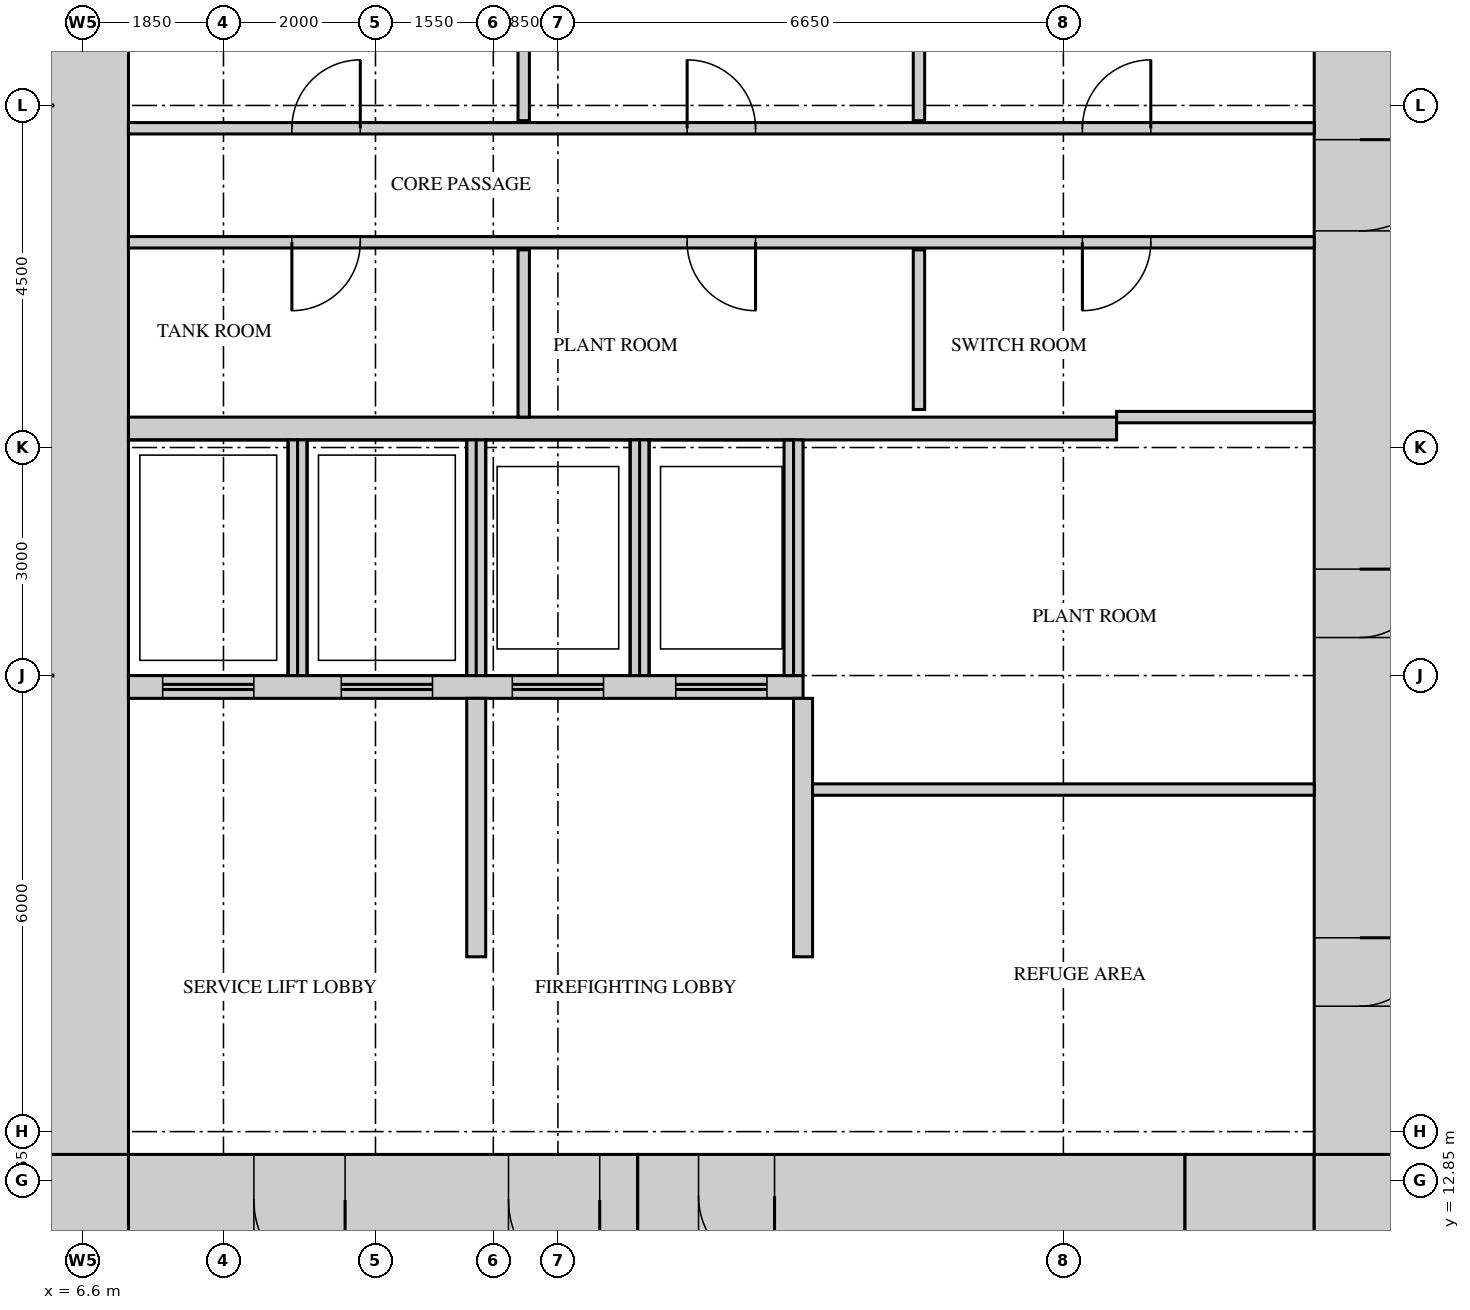
"""IFC4 building model, lengths in metres.
Left out: names, types, materials, properties, quantities, classifications, styles, units other than length and angle.
Written with IfcOpenShell. Run it as: python <this file> out.ifc"""

import sys

from ifc_helpers import new_model, si_unit, direction, frame, frame_2d, origin, place, context, subcontext, project, spatial, rectangle, extrude, source, transform, mapped, element, fill, save


model = new_model("IFC4")
c1 = context("Model", 3, precision=1e-05, world=origin(), true_north=direction((0.0, 1.0)))
c2 = subcontext(c1, "Body", "Model", "MODEL_VIEW")
j1 = project(units=[si_unit("LENGTHUNIT", "METRE"), si_unit("PLANEANGLEUNIT", "RADIAN")], contexts=[c1])
p1 = place(None, origin())
s1 = spatial("IfcSite", under=j1, at=p1, CompositionType="ELEMENT")
p2 = place(p1, origin())
s2 = spatial("IfcBuilding", under=s1, at=p2, CompositionType="ELEMENT")
p3 = place(p2, frame((0.0, 0.0, 96.0)))
s3 = spatial("IfcBuildingStorey", under=s2, at=p3, CompositionType="ELEMENT", Elevation=96.0)
m1 = source(origin(), c2, "Body", "SweptSolid", [
    extrude(rectangle(XDim=6.7, YDim=1.2, at=frame_2d((3.35, 0.0))), origin(), (0.0, 0.0, 1.0), 5.2),
])
p4 = place(p3, frame((7.2, 12.6, 0.0), z_axis=(0.0, 0.0, 1.0), x_axis=(1.0, 0.0, 0.0)))
e1 = element("IfcWall", 1, at=p4, inside=s3, PredefinedType="SHEAR", context=c2, shape_type="MappedRepresentation", body=[
    mapped(m1, transform((0.0, 0.0, 0.0))),
])
m2 = source(origin(), c2, "Body", "SweptSolid", [
    extrude(rectangle(XDim=1.2, YDim=2.1, at=frame_2d((0.6, 1.05))), frame((0.0, 0.61, 0.0), z_axis=(0.0, -1.0, 0.0), x_axis=(1.0, 0.0, 0.0)), (0.0, 0.0, 1.0), 1.22),
])
p5 = place(p4, frame((5.0, 0.0, 0.0)))
e2 = element("IfcOpeningElement", 2, at=p5, cuts=e1, PredefinedType="OPENING", context=c2, shape_type="MappedRepresentation", body=[
    mapped(m2, transform((0.0, 0.0, 0.0))),
])
p6 = place(p4, frame((1.65, 0.0, 0.0)))
e3 = element("IfcOpeningElement", 3, at=p6, cuts=e1, PredefinedType="OPENING", context=c2, shape_type="MappedRepresentation", body=[
    mapped(m2, transform((0.0, 0.0, 0.0))),
])
m3 = source(origin(), c2, "Body", "SweptSolid", [
    extrude(rectangle(XDim=7.2, YDim=1.1, at=frame_2d((3.6, 0.0))), origin(), (0.0, 0.0, 1.0), 5.2),
])
p7 = place(p3, frame((13.9, 12.65, 0.0), z_axis=(0.0, 0.0, 1.0), x_axis=(1.0, 0.0, 0.0)))
e4 = element("IfcWall", 4, at=p7, inside=s3, PredefinedType="SHEAR", context=c2, shape_type="MappedRepresentation", body=[
    mapped(m3, transform((0.0, 0.0, 0.0))),
])
m4 = source(origin(), c2, "Body", "SweptSolid", [
    extrude(rectangle(XDim=1.0, YDim=2.1, at=frame_2d((0.5, 1.05))), frame((0.0, 0.56, 0.0), z_axis=(0.0, -1.0, 0.0), x_axis=(1.0, 0.0, 0.0)), (0.0, 0.0, 1.0), 1.12),
])
p8 = place(p7, frame((0.8, 0.0, 0.0)))
e5 = element("IfcOpeningElement", 5, at=p8, cuts=e4, PredefinedType="OPENING", context=c2, shape_type="MappedRepresentation", body=[
    mapped(m4, transform((0.0, 0.0, 0.0))),
])
m5 = source(origin(), c2, "Body", "SweptSolid", [
    extrude(rectangle(XDim=1.7, YDim=1.2, at=frame_2d((0.85, 0.0))), origin(), (0.0, 0.0, 1.0), 5.2),
])
p9 = place(p3, frame((21.1, 12.6, 0.0), z_axis=(0.0, 0.0, 1.0), x_axis=(1.0, 0.0, 0.0)))
e6 = element("IfcWall", 6, at=p9, inside=s3, PredefinedType="SHEAR", context=c2, shape_type="MappedRepresentation", body=[
    mapped(m5, transform((0.0, 0.0, 0.0))),
])
m6 = source(origin(), c2, "Body", "SweptSolid", [
    extrude(rectangle(XDim=1.2, YDim=1.2, at=frame_2d((0.6, 0.0))), origin(), (0.0, 0.0, 1.0), 5.2),
])
for number, where, z_axis, x_axis in (
    (7, (22.8, 12.6, 0.0), (0.0, 0.0, 1.0), (1.0, 0.0, 0.0)),
    (8, (6.0, 12.6, 0.0), (0.0, 0.0, 1.0), (1.0, 0.0, 0.0)),
):
    element("IfcWall", number, at=place(p3, frame(where, z_axis=z_axis, x_axis=x_axis)), inside=s3, PredefinedType="SHEAR", context=c2, shape_type="MappedRepresentation", body=[
        mapped(m6, transform((0.0, 0.0, 0.0))),
    ])
m7 = source(origin(), c2, "Body", "SweptSolid", [
    extrude(rectangle(XDim=27.6, YDim=1.2, at=frame_2d((13.8, 0.0))), origin(), (0.0, 0.0, 1.0), 5.2),
])
p10 = place(p3, frame((23.4, 13.2, 0.0), z_axis=(0.0, 0.0, 1.0), x_axis=(0.0, 1.0, 0.0)))
e9 = element("IfcWall", 9, at=p10, inside=s3, PredefinedType="SHEAR", context=c2, shape_type="MappedRepresentation", body=[
    mapped(m7, transform((0.0, 0.0, 0.0))),
])
m8 = source(origin(), c2, "Body", "SweptSolid", [
    extrude(rectangle(XDim=1.8, YDim=2.1, at=frame_2d((0.9, 1.05))), frame((0.0, 0.61, 0.0), z_axis=(0.0, -1.0, 0.0), x_axis=(1.0, 0.0, 0.0)), (0.0, 0.0, 1.0), 1.22),
])
p11 = place(p10, frame((22.4, 0.0, 0.0)))
e10 = element("IfcOpeningElement", 10, at=p11, cuts=e9, PredefinedType="OPENING", context=c2, shape_type="MappedRepresentation", body=[
    mapped(m8, transform((0.0, 0.0, 0.0))),
])
p12 = place(p10, frame((12.15, 0.0, 0.0)))
e11 = element("IfcOpeningElement", 11, at=p12, cuts=e9, PredefinedType="OPENING", context=c2, shape_type="MappedRepresentation", body=[
    mapped(m2, transform((0.0, 0.0, 0.0))),
])
m9 = source(origin(), c2, "Body", "SweptSolid", [
    extrude(rectangle(XDim=0.9, YDim=2.1, at=frame_2d((0.45, 1.05))), frame((0.0, 0.61, 0.0), z_axis=(0.0, -1.0, 0.0), x_axis=(1.0, 0.0, 0.0)), (0.0, 0.0, 1.0), 1.22),
])
p13 = place(p10, frame((1.95, 0.0, 0.0)))
e12 = element("IfcOpeningElement", 12, at=p13, cuts=e9, PredefinedType="OPENING", context=c2, shape_type="MappedRepresentation", body=[
    mapped(m9, transform((0.0, 0.0, 0.0))),
])
p14 = place(p10, frame((6.8, 0.0, 0.0)))
e13 = element("IfcOpeningElement", 13, at=p14, cuts=e9, PredefinedType="OPENING", context=c2, shape_type="MappedRepresentation", body=[
    mapped(m9, transform((0.0, 0.0, 0.0))),
])
p15 = place(p3, frame((6.6, 13.2, 0.0), z_axis=(0.0, 0.0, 1.0), x_axis=(0.0, 1.0, 0.0)))
e14 = element("IfcWall", 14, at=p15, inside=s3, PredefinedType="SHEAR", context=c2, shape_type="MappedRepresentation", body=[
    mapped(m7, transform((0.0, 0.0, 0.0))),
])
m10 = source(origin(), c2, "Body", "SweptSolid", [
    extrude(rectangle(XDim=13.0, YDim=0.3, at=frame_2d((6.5, 0.0))), origin(), (0.0, 0.0, 1.0), 5.2),
])
p16 = place(p3, frame((7.2, 22.75, 0.0), z_axis=(0.0, 0.0, 1.0), x_axis=(1.0, 0.0, 0.0)))
e15 = element("IfcWall", 15, at=p16, inside=s3, PredefinedType="STANDARD", context=c2, shape_type="MappedRepresentation", body=[
    mapped(m10, transform((0.0, 0.0, 0.0))),
])
m11 = source(origin(), c2, "Body", "SweptSolid", [
    extrude(rectangle(XDim=8.875, YDim=0.3, at=frame_2d((4.438, 0.0))), origin(), (0.0, 0.0, 1.0), 5.2),
])
p17 = place(p3, frame((7.2, 19.35, 0.0), z_axis=(0.0, 0.0, 1.0), x_axis=(1.0, 0.0, 0.0)))
e16 = element("IfcWall", 16, at=p17, inside=s3, PredefinedType="STANDARD", context=c2, shape_type="MappedRepresentation", body=[
    mapped(m11, transform((0.0, 0.0, 0.0))),
])
m12 = source(origin(), c2, "Body", "SweptSolid", [
    extrude(rectangle(XDim=1.2, YDim=2.1, at=frame_2d((0.6, 1.05))), frame((0.0, 0.16, 0.0), z_axis=(0.0, -1.0, 0.0), x_axis=(1.0, 0.0, 0.0)), (0.0, 0.0, 1.0), 0.32),
])
p18 = place(p17, frame((0.45, 0.0, 0.0)))
e17 = element("IfcOpeningElement", 17, at=p18, cuts=e16, PredefinedType="OPENING", context=c2, shape_type="MappedRepresentation", body=[
    mapped(m12, transform((0.0, 0.0, 0.0))),
])
p19 = place(p17, frame((2.8, 0.0, 0.0)))
e18 = element("IfcOpeningElement", 18, at=p19, cuts=e16, PredefinedType="OPENING", context=c2, shape_type="MappedRepresentation", body=[
    mapped(m12, transform((0.0, 0.0, 0.0))),
])
p20 = place(p17, frame((5.05, 0.0, 0.0)))
e19 = element("IfcOpeningElement", 19, at=p20, cuts=e16, PredefinedType="OPENING", context=c2, shape_type="MappedRepresentation", body=[
    mapped(m12, transform((0.0, 0.0, 0.0))),
])
p21 = place(p17, frame((7.2, 0.0, 0.0)))
e20 = element("IfcOpeningElement", 20, at=p21, cuts=e16, PredefinedType="OPENING", context=c2, shape_type="MappedRepresentation", body=[
    mapped(m12, transform((0.0, 0.0, 0.0))),
])
m13 = source(origin(), c2, "Body", "SweptSolid", [
    extrude(rectangle(XDim=3.1, YDim=0.25, at=frame_2d((1.55, 0.0))), origin(), (0.0, 0.0, 1.0), 5.2),
])
for number, where, z_axis, x_axis in (
    (21, (9.425, 19.5, 0.0), (0.0, 0.0, 1.0), (0.0, 1.0, 0.0)),
    (22, (11.775, 19.5, 0.0), (0.0, 0.0, 1.0), (0.0, 1.0, 0.0)),
    (23, (13.925, 19.5, 0.0), (0.0, 0.0, 1.0), (0.0, 1.0, 0.0)),
    (24, (15.95, 19.5, 0.0), (0.0, 0.0, 1.0), (0.0, 1.0, 0.0)),
):
    element("IfcWall", number, at=place(p3, frame(where, z_axis=z_axis, x_axis=x_axis)), inside=s3, PredefinedType="STANDARD", context=c2, shape_type="MappedRepresentation", body=[
        mapped(m13, transform((0.0, 0.0, 0.0))),
    ])
m14 = source(origin(), c2, "Body", "SweptSolid", [
    extrude(rectangle(XDim=3.4, YDim=0.25, at=frame_2d((1.7, 0.0))), origin(), (0.0, 0.0, 1.0), 5.2),
])
for number, where, z_axis, x_axis in (
    (25, (16.075, 15.8, 0.0), (0.0, 0.0, 1.0), (0.0, 1.0, 0.0)),
    (26, (11.775, 15.8, 0.0), (0.0, 0.0, 1.0), (0.0, 1.0, 0.0)),
):
    element("IfcWall", number, at=place(p3, frame(where, z_axis=z_axis, x_axis=x_axis)), inside=s3, PredefinedType="STANDARD", context=c2, shape_type="MappedRepresentation", body=[
        mapped(m14, transform((0.0, 0.0, 0.0))),
    ])
m15 = source(origin(), c2, "Body", "SweptSolid", [
    extrude(rectangle(XDim=6.6, YDim=0.15, at=frame_2d((3.3, 0.0))), origin(), (0.0, 0.0, 1.0), 5.2),
])
p22 = place(p3, frame((16.2, 18.0, 0.0), z_axis=(0.0, 0.0, 1.0), x_axis=(1.0, 0.0, 0.0)))
e27 = element("IfcWall", 27, at=p22, inside=s3, PredefinedType="PARTITIONING", context=c2, shape_type="MappedRepresentation", body=[
    mapped(m15, transform((0.0, 0.0, 0.0))),
])
m16 = source(origin(), c2, "Body", "SweptSolid", [
    extrude(rectangle(XDim=2.2, YDim=0.15, at=frame_2d((1.1, 0.0))), origin(), (0.0, 0.0, 1.0), 5.2),
])
p23 = place(p3, frame((12.4, 22.9, 0.0), z_axis=(0.0, 0.0, 1.0), x_axis=(0.0, 1.0, 0.0)))
e28 = element("IfcWall", 28, at=p23, inside=s3, PredefinedType="PARTITIONING", context=c2, shape_type="MappedRepresentation", body=[
    mapped(m16, transform((0.0, 0.0, 0.0))),
])
m17 = source(origin(), c2, "Body", "SweptSolid", [
    extrude(rectangle(XDim=2.6, YDim=0.15, at=frame_2d((1.3, 0.0))), origin(), (0.0, 0.0, 1.0), 5.2),
])
p24 = place(p3, frame((20.2, 22.9, 0.0), z_axis=(0.0, 0.0, 1.0), x_axis=(1.0, 0.0, 0.0)))
e29 = element("IfcWall", 29, at=p24, inside=s3, PredefinedType="PARTITIONING", context=c2, shape_type="MappedRepresentation", body=[
    mapped(m17, transform((0.0, 0.0, 0.0))),
])
m18 = source(origin(), c2, "Body", "SweptSolid", [
    extrude(rectangle(XDim=2.1, YDim=0.15, at=frame_2d((1.05, 0.0))), origin(), (0.0, 0.0, 1.0), 5.2),
])
p25 = place(p3, frame((17.6, 23.0, 0.0), z_axis=(0.0, 0.0, 1.0), x_axis=(0.0, 1.0, 0.0)))
e30 = element("IfcWall", 30, at=p25, inside=s3, PredefinedType="PARTITIONING", context=c2, shape_type="MappedRepresentation", body=[
    mapped(m18, transform((0.0, 0.0, 0.0))),
])
m19 = source(origin(), c2, "Body", "SweptSolid", [
    extrude(rectangle(XDim=15.6, YDim=0.15, at=frame_2d((7.8, 0.0))), origin(), (0.0, 0.0, 1.0), 5.2),
])
p26 = place(p3, frame((7.2, 25.2, 0.0), z_axis=(0.0, 0.0, 1.0), x_axis=(1.0, 0.0, 0.0)))
e31 = element("IfcWall", 31, at=p26, inside=s3, PredefinedType="PARTITIONING", context=c2, shape_type="MappedRepresentation", body=[
    mapped(m19, transform((0.0, 0.0, 0.0))),
])
m20 = source(origin(), c2, "Body", "SweptSolid", [
    extrude(rectangle(XDim=0.9, YDim=2.1, at=frame_2d((0.45, 1.05))), frame((0.0, 0.085, 0.0), z_axis=(0.0, -1.0, 0.0), x_axis=(1.0, 0.0, 0.0)), (0.0, 0.0, 1.0), 0.17),
])
p27 = place(p26, frame((2.15, 0.0, 0.0)))
e32 = element("IfcOpeningElement", 32, at=p27, cuts=e31, PredefinedType="OPENING", context=c2, shape_type="MappedRepresentation", body=[
    mapped(m20, transform((0.0, 0.0, 0.0))),
])
p28 = place(p26, frame((7.35, 0.0, 0.0)))
e33 = element("IfcOpeningElement", 33, at=p28, cuts=e31, PredefinedType="OPENING", context=c2, shape_type="MappedRepresentation", body=[
    mapped(m20, transform((0.0, 0.0, 0.0))),
])
p29 = place(p26, frame((12.55, 0.0, 0.0)))
e34 = element("IfcOpeningElement", 34, at=p29, cuts=e31, PredefinedType="OPENING", context=c2, shape_type="MappedRepresentation", body=[
    mapped(m20, transform((0.0, 0.0, 0.0))),
])
p30 = place(p3, frame((7.2, 26.7, 0.0), z_axis=(0.0, 0.0, 1.0), x_axis=(1.0, 0.0, 0.0)))
e35 = element("IfcWall", 35, at=p30, inside=s3, PredefinedType="PARTITIONING", context=c2, shape_type="MappedRepresentation", body=[
    mapped(m19, transform((0.0, 0.0, 0.0))),
])
p31 = place(p30, frame((2.15, 0.0, 0.0)))
e36 = element("IfcOpeningElement", 36, at=p31, cuts=e35, PredefinedType="OPENING", context=c2, shape_type="MappedRepresentation", body=[
    mapped(m20, transform((0.0, 0.0, 0.0))),
])
p32 = place(p30, frame((7.35, 0.0, 0.0)))
e37 = element("IfcOpeningElement", 37, at=p32, cuts=e35, PredefinedType="OPENING", context=c2, shape_type="MappedRepresentation", body=[
    mapped(m20, transform((0.0, 0.0, 0.0))),
])
p33 = place(p30, frame((12.55, 0.0, 0.0)))
e38 = element("IfcOpeningElement", 38, at=p33, cuts=e35, PredefinedType="OPENING", context=c2, shape_type="MappedRepresentation", body=[
    mapped(m20, transform((0.0, 0.0, 0.0))),
])
m21 = source(origin(), c2, "Body", "SweptSolid", [
    extrude(rectangle(XDim=5.1, YDim=0.15, at=frame_2d((2.55, 0.0))), origin(), (0.0, 0.0, 1.0), 5.2),
])
for number, where, z_axis, x_axis in (
    (39, (12.4, 26.8, 0.0), (0.0, 0.0, 1.0), (0.0, 1.0, 0.0)),
    (40, (17.6, 26.8, 0.0), (0.0, 0.0, 1.0), (0.0, 1.0, 0.0)),
):
    element("IfcWall", number, at=place(p3, frame(where, z_axis=z_axis, x_axis=x_axis)), inside=s3, PredefinedType="PARTITIONING", context=c2, shape_type="MappedRepresentation", body=[
        mapped(m21, transform((0.0, 0.0, 0.0))),
    ])
m22 = source(origin(), c2, "Body", "SweptSolid", [
    extrude(rectangle(XDim=1.2, YDim=2.1, at=frame_2d((0.6, 1.05))), frame((0.0, 0.55, 0.0), z_axis=(0.0, -1.0, 0.0), x_axis=(1.0, 0.0, 0.0)), (0.0, 0.0, 1.0), 1.1),
])
p34 = place(p12, origin())
e41 = element("IfcDoor", 41, at=p34, inside=s3, OperationType="SINGLE_SWING_RIGHT", PredefinedType="DOOR", context=c2, shape_type="MappedRepresentation", body=[
    mapped(m22, transform((0.0, 0.0, 0.0))),
])
fill(e11, e41)
m23 = source(origin(), c2, "Body", "SweptSolid", [
    extrude(rectangle(XDim=0.9, YDim=2.1, at=frame_2d((0.45, 1.05))), frame((0.0, 0.025, 0.0), z_axis=(0.0, -1.0, 0.0), x_axis=(1.0, 0.0, 0.0)), (0.0, 0.0, 1.0), 0.05),
])
p35 = place(p31, origin())
e42 = element("IfcDoor", 42, at=p35, inside=s3, OperationType="SINGLE_SWING_LEFT", PredefinedType="DOOR", context=c2, shape_type="MappedRepresentation", body=[
    mapped(m23, transform((0.0, 0.0, 0.0))),
])
fill(e36, e42)
p36 = place(p32, origin())
e43 = element("IfcDoor", 43, at=p36, inside=s3, OperationType="SINGLE_SWING_RIGHT", PredefinedType="DOOR", context=c2, shape_type="MappedRepresentation", body=[
    mapped(m23, transform((0.0, 0.0, 0.0))),
])
fill(e37, e43)
p37 = place(p33, origin())
e44 = element("IfcDoor", 44, at=p37, inside=s3, OperationType="SINGLE_SWING_LEFT", PredefinedType="DOOR", context=c2, shape_type="MappedRepresentation", body=[
    mapped(m23, transform((0.0, 0.0, 0.0))),
])
fill(e38, e44)
p38 = place(p27, origin())
e45 = element("IfcDoor", 45, at=p38, inside=s3, OperationType="SINGLE_SWING_LEFT", PredefinedType="DOOR", context=c2, shape_type="MappedRepresentation", body=[
    mapped(m23, transform((0.0, 0.0, 0.0))),
])
fill(e32, e45)
p39 = place(p28, origin())
e46 = element("IfcDoor", 46, at=p39, inside=s3, OperationType="SINGLE_SWING_RIGHT", PredefinedType="DOOR", context=c2, shape_type="MappedRepresentation", body=[
    mapped(m23, transform((0.0, 0.0, 0.0))),
])
fill(e33, e46)
p40 = place(p29, origin())
e47 = element("IfcDoor", 47, at=p40, inside=s3, OperationType="SINGLE_SWING_LEFT", PredefinedType="DOOR", context=c2, shape_type="MappedRepresentation", body=[
    mapped(m23, transform((0.0, 0.0, 0.0))),
])
fill(e34, e47)
m24 = source(origin(), c2, "Body", "SweptSolid", [
    extrude(rectangle(XDim=0.9, YDim=2.1, at=frame_2d((0.45, 1.05))), frame((0.0, 0.55, 0.0), z_axis=(0.0, -1.0, 0.0), x_axis=(1.0, 0.0, 0.0)), (0.0, 0.0, 1.0), 1.1),
])
p41 = place(p13, origin())
e48 = element("IfcDoor", 48, at=p41, inside=s3, OperationType="SINGLE_SWING_RIGHT", PredefinedType="DOOR", context=c2, shape_type="MappedRepresentation", body=[
    mapped(m24, transform((0.0, 0.0, 0.0))),
])
fill(e12, e48)
p42 = place(p14, origin())
e49 = element("IfcDoor", 49, at=p42, inside=s3, OperationType="SINGLE_SWING_RIGHT", PredefinedType="DOOR", context=c2, shape_type="MappedRepresentation", body=[
    mapped(m24, transform((0.0, 0.0, 0.0))),
])
fill(e13, e49)
p43 = place(p5, origin())
e50 = element("IfcDoor", 50, at=p43, inside=s3, OperationType="SINGLE_SWING_RIGHT", PredefinedType="DOOR", context=c2, shape_type="MappedRepresentation", body=[
    mapped(m22, transform((0.0, 0.0, 0.0))),
])
fill(e2, e50)
p44 = place(p6, origin())
e51 = element("IfcDoor", 51, at=p44, inside=s3, OperationType="SINGLE_SWING_RIGHT", PredefinedType="DOOR", context=c2, shape_type="MappedRepresentation", body=[
    mapped(m22, transform((0.0, 0.0, 0.0))),
])
fill(e3, e51)
m25 = source(origin(), c2, "Body", "SweptSolid", [
    extrude(rectangle(XDim=1.0, YDim=2.1, at=frame_2d((0.5, 1.05))), frame((0.0, 0.5, 0.0), z_axis=(0.0, -1.0, 0.0), x_axis=(1.0, 0.0, 0.0)), (0.0, 0.0, 1.0), 1.0),
])
p45 = place(p8, origin())
e52 = element("IfcDoor", 52, at=p45, inside=s3, OperationType="SINGLE_SWING_RIGHT", PredefinedType="DOOR", context=c2, shape_type="MappedRepresentation", body=[
    mapped(m25, transform((0.0, 0.0, 0.0))),
])
fill(e5, e52)
m26 = source(origin(), c2, "Body", "SweptSolid", [
    extrude(rectangle(XDim=1.2, YDim=2.1, at=frame_2d((0.6, 1.05))), frame((0.0, 0.025, 0.0), z_axis=(0.0, -1.0, 0.0), x_axis=(1.0, 0.0, 0.0)), (0.0, 0.0, 1.0), 0.05),
])
p46 = place(p18, origin())
e53 = element("IfcDoor", 53, at=p46, inside=s3, OperationType="DOUBLE_DOOR_SLIDING", PredefinedType="DOOR", context=c2, shape_type="MappedRepresentation", body=[
    mapped(m26, transform((0.0, 0.0, 0.0))),
])
fill(e17, e53)
p47 = place(p19, origin())
e54 = element("IfcDoor", 54, at=p47, inside=s3, OperationType="DOUBLE_DOOR_SLIDING", PredefinedType="DOOR", context=c2, shape_type="MappedRepresentation", body=[
    mapped(m26, transform((0.0, 0.0, 0.0))),
])
fill(e18, e54)
p48 = place(p20, origin())
e55 = element("IfcDoor", 55, at=p48, inside=s3, OperationType="DOUBLE_DOOR_SLIDING", PredefinedType="DOOR", context=c2, shape_type="MappedRepresentation", body=[
    mapped(m26, transform((0.0, 0.0, 0.0))),
])
fill(e19, e55)
p49 = place(p21, origin())
e56 = element("IfcDoor", 56, at=p49, inside=s3, OperationType="DOUBLE_DOOR_SLIDING", PredefinedType="DOOR", context=c2, shape_type="MappedRepresentation", body=[
    mapped(m26, transform((0.0, 0.0, 0.0))),
])
fill(e20, e56)
save(model, sys.argv[1])
